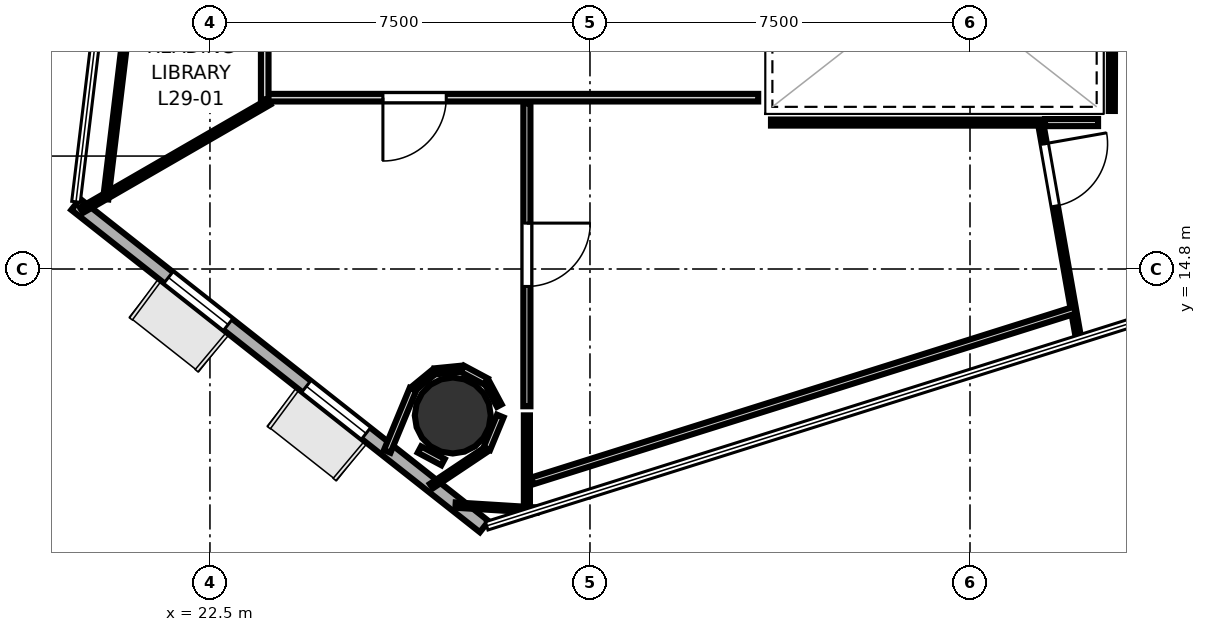
"""IFC4 building model, lengths in metres.
Left out: names, types, materials, properties, quantities, classifications, styles, units other than length and angle.
Written with IfcOpenShell. Run it as: python <this file> out.ifc"""

import sys

from ifc_helpers import new_model, si_unit, direction, frame, frame_2d, origin, origin_2d, place, context, subcontext, project, spatial, rectangle, hollow_circle, extrude, element, fill, save


model = new_model("IFC4")
c1 = context("Model", 3, precision=1e-05, world=origin(), true_north=direction((0.0, 1.0)))
c2 = subcontext(c1, "Body", "Model", "MODEL_VIEW")
j1 = project(units=[si_unit("LENGTHUNIT", "METRE"), si_unit("PLANEANGLEUNIT", "RADIAN")], contexts=[c1])
p1 = place(None, origin())
s1 = spatial("IfcSite", under=j1, at=p1, CompositionType="ELEMENT")
p2 = place(p1, origin())
s2 = spatial("IfcBuilding", under=s1, at=p2, CompositionType="ELEMENT")
p3 = place(p2, frame((0.0, 0.0, 116.3)))
s3 = spatial("IfcBuildingStorey", under=s2, at=p3, CompositionType="ELEMENT", Elevation=116.3)
p4 = place(p3, frame((27.292, 11.909, 0.0), z_axis=(0.0, 0.0, 1.0), x_axis=(1.0, 0.0, 0.0)))
e1 = element("IfcColumn", 1, at=p4, inside=s3, PredefinedType="COLUMN", context=c2, shape_type="SweptSolid", body=[
    extrude(hollow_circle(Radius=0.75, WallThickness=0.036, at=origin_2d()), origin(), (0.0, 0.0, 1.0), 3.7),
])
p5 = place(p3, frame((19.85, 16.076, 0.0), z_axis=(0.0, 0.0, 1.0), x_axis=(0.785148009035, -0.619308165543, 0.0)))
e2 = element("IfcWall", 2, at=p5, inside=s3, PredefinedType="SOLIDWALL", context=c2, shape_type="SweptSolid", body=[
    extrude(rectangle(XDim=10.27, YDim=0.28, at=frame_2d((5.135, 0.0))), origin(), (0.0, 0.0, 1.0), 3.52),
])
p6 = place(p5, frame((2.331, 0.0, 0.85)))
e3 = element("IfcOpeningElement", 3, at=p6, cuts=e2, PredefinedType="OPENING", context=c2, shape_type="SweptSolid", body=[
    extrude(rectangle(XDim=1.5, YDim=2.1, at=frame_2d((0.75, 1.05))), frame((0.0, 0.15, 0.0), z_axis=(0.0, -1.0, 0.0), x_axis=(1.0, 0.0, 0.0)), (0.0, 0.0, 1.0), 0.3),
])
p7 = place(p5, frame((5.799, 0.0, 0.85)))
e4 = element("IfcOpeningElement", 4, at=p7, cuts=e2, PredefinedType="OPENING", context=c2, shape_type="SweptSolid", body=[
    extrude(rectangle(XDim=1.5, YDim=2.1, at=frame_2d((0.75, 1.05))), frame((0.0, 0.15, 0.0), z_axis=(0.0, -1.0, 0.0), x_axis=(1.0, 0.0, 0.0)), (0.0, 0.0, 1.0), 0.3),
])
p8 = place(p3, frame((33.32, 18.181, 0.0), z_axis=(0.0, 0.0, 1.0), x_axis=(-1.0, 0.0, 0.0)))
e5 = element("IfcWall", 5, at=p8, inside=s3, PredefinedType="PARTITIONING", context=c2, shape_type="SweptSolid", body=[
    extrude(rectangle(XDim=9.77, YDim=0.15, at=frame_2d((4.885, 0.0))), origin(), (0.0, 0.0, 1.0), 2.84),
])
p9 = place(p8, frame((6.156, 0.0, 0.0)))
e6 = element("IfcOpeningElement", 6, at=p9, cuts=e5, PredefinedType="OPENING", context=c2, shape_type="SweptSolid", body=[
    extrude(rectangle(XDim=1.25, YDim=2.2, at=frame_2d((0.625, 1.1))), frame((0.0, 0.085, 0.0), z_axis=(0.0, -1.0, 0.0), x_axis=(1.0, 0.0, 0.0)), (0.0, 0.0, 1.0), 0.17),
])
p10 = place(p3, frame((23.581, 18.15, 0.0), z_axis=(0.0, 0.0, 1.0), x_axis=(0.0, 1.0, 0.0)))
e7 = element("IfcWall", 7, at=p10, inside=s3, PredefinedType="PARTITIONING", context=c2, shape_type="SweptSolid", body=[
    extrude(rectangle(XDim=8.575, YDim=0.15, at=frame_2d((4.288, 0.0))), origin(), (0.0, 0.0, 1.0), 2.84),
])
p11 = place(p10, frame((3.663, 0.0, 0.0)))
e8 = element("IfcOpeningElement", 8, at=p11, cuts=e7, PredefinedType="OPENING", context=c2, shape_type="SweptSolid", body=[
    extrude(rectangle(XDim=1.25, YDim=2.2, at=frame_2d((0.625, 1.1))), frame((0.0, 0.085, 0.0), z_axis=(0.0, -1.0, 0.0), x_axis=(1.0, 0.0, 0.0)), (0.0, 0.0, 1.0), 0.17),
])
p12 = place(p3, frame((23.665, 18.097, 0.0), z_axis=(0.0, 0.0, 1.0), x_axis=(-0.866050431771, -0.49995664775, 0.0)))
e9 = element("IfcWall", 9, at=p12, inside=s3, PredefinedType="PARTITIONING", context=c2, shape_type="SweptSolid", body=[
    extrude(rectangle(XDim=4.271, YDim=0.12, at=frame_2d((2.136, 0.0))), origin(), (0.0, 0.0, 1.0), 2.84),
])
p13 = place(p3, frame((20.443, 16.179, 0.0), z_axis=(0.0, 0.0, 1.0), x_axis=(0.11977901292, 0.992800578195, 0.0)))
e10 = element("IfcWall", 10, at=p13, inside=s3, PredefinedType="PARTITIONING", context=c2, shape_type="SweptSolid", body=[
    extrude(rectangle(XDim=17.847, YDim=0.105, at=frame_2d((8.923, 0.0))), origin(), (0.0, 0.0, 1.0), 2.84),
])
p14 = place(p3, frame((28.211, 12.104, 0.0), z_axis=(0.0, 0.0, 1.0), x_axis=(-0.472156867062, 0.881514544909, 0.0)))
e11 = element("IfcWall", 11, at=p14, inside=s3, PredefinedType="PARTITIONING", context=c2, shape_type="SweptSolid", body=[
    extrude(rectangle(XDim=0.525, YDim=0.105, at=frame_2d((0.262, 0.0))), origin(), (0.0, 0.0, 1.0), 2.84),
])
p15 = place(p3, frame((27.95, 12.58, 0.0), z_axis=(0.0, 0.0, 1.0), x_axis=(-0.881994580882, 0.471259545574, 0.0)))
e12 = element("IfcWall", 12, at=p15, inside=s3, PredefinedType="PARTITIONING", context=c2, shape_type="SweptSolid", body=[
    extrude(rectangle(XDim=0.528, YDim=0.14, at=frame_2d((0.264, 0.0))), origin(), (0.0, 0.0, 1.0), 2.84),
])
p16 = place(p3, frame((27.467, 12.833, 0.0), z_axis=(0.0, 0.0, 1.0), x_axis=(-0.995146366598, -0.09840583848, 0.0)))
e13 = element("IfcWall", 13, at=p16, inside=s3, PredefinedType="PARTITIONING", context=c2, shape_type="SweptSolid", body=[
    extrude(rectangle(XDim=0.529, YDim=0.12, at=frame_2d((0.264, 0.0))), origin(), (0.0, 0.0, 1.0), 2.84),
])
p17 = place(p3, frame((26.924, 12.774, 0.0), z_axis=(0.0, 0.0, 1.0), x_axis=(-0.773009460249, -0.634394494275, 0.0)))
e14 = element("IfcWall", 14, at=p17, inside=s3, PredefinedType="PARTITIONING", context=c2, shape_type="SweptSolid", body=[
    extrude(rectangle(XDim=0.528, YDim=0.105, at=frame_2d((0.264, 0.0))), origin(), (0.0, 0.0, 1.0), 2.84),
])
p18 = place(p3, frame((26.507, 12.427, 0.0), z_axis=(0.0, 0.0, 1.0), x_axis=(-0.38275828623, -0.923848523473, 0.0)))
e15 = element("IfcWall", 15, at=p18, inside=s3, PredefinedType="PARTITIONING", context=c2, shape_type="SweptSolid", body=[
    extrude(rectangle(XDim=1.326, YDim=0.14, at=frame_2d((0.663, 0.0))), origin(), (0.0, 0.0, 1.0), 2.84),
])
p19 = place(p3, frame((26.634, 11.238, 0.0), z_axis=(0.0, 0.0, 1.0), x_axis=(0.881802511994, -0.471618839574, 0.0)))
e16 = element("IfcWall", 16, at=p19, inside=s3, PredefinedType="PARTITIONING", context=c2, shape_type="SweptSolid", body=[
    extrude(rectangle(XDim=0.529, YDim=0.14, at=frame_2d((0.264, 0.0))), origin(), (0.0, 0.0, 1.0), 2.84),
])
p20 = place(p3, frame((26.869, 10.515, 0.0), z_axis=(0.0, 0.0, 1.0), x_axis=(0.831386976724, 0.555693885997, 0.0)))
e17 = element("IfcWall", 17, at=p20, inside=s3, PredefinedType="PARTITIONING", context=c2, shape_type="SweptSolid", body=[
    extrude(rectangle(XDim=1.303, YDim=0.105, at=frame_2d((0.652, 0.0))), origin(), (0.0, 0.0, 1.0), 2.84),
])
p21 = place(p3, frame((27.964, 11.254, 0.0), z_axis=(0.0, 0.0, 1.0), x_axis=(0.381929177829, 0.92419159438, 0.0)))
e18 = element("IfcWall", 18, at=p21, inside=s3, PredefinedType="PARTITIONING", context=c2, shape_type="SweptSolid", body=[
    extrude(rectangle(XDim=0.698, YDim=0.14, at=frame_2d((0.349, 0.0))), origin(), (0.0, 0.0, 1.0), 2.84),
])
p22 = place(p3, frame((28.755, 11.912, 0.0), z_axis=(0.0, 0.0, 1.0), x_axis=(0.0, -1.0, 0.0)))
e19 = element("IfcWall", 19, at=p22, inside=s3, PredefinedType="PARTITIONING", context=c2, shape_type="SweptSolid", body=[
    extrude(rectangle(XDim=1.951, YDim=0.12, at=frame_2d((0.976, 0.0))), origin(), (0.0, 0.0, 1.0), 2.84),
])
p23 = place(p3, frame((28.95, 10.042, 0.0), z_axis=(0.0, 0.0, 1.0), x_axis=(-0.998073234179, 0.062046911404, 0.0)))
e20 = element("IfcWall", 20, at=p23, inside=s3, PredefinedType="PARTITIONING", context=c2, shape_type="SweptSolid", body=[
    extrude(rectangle(XDim=1.605, YDim=0.105, at=frame_2d((0.803, 0.0))), origin(), (0.0, 0.0, 1.0), 2.84),
])
p24 = place(p3, frame((28.755, 18.07, 0.0), z_axis=(0.0, 0.0, 1.0), x_axis=(0.0, -1.0, 0.0)))
e21 = element("IfcWall", 21, at=p24, inside=s3, PredefinedType="PARTITIONING", context=c2, shape_type="SweptSolid", body=[
    extrude(rectangle(XDim=5.979, YDim=0.14, at=frame_2d((2.989, 0.0))), origin(), (0.0, 0.0, 1.0), 2.84),
])
p25 = place(p24, frame((2.364, 0.0, 0.0)))
e22 = element("IfcOpeningElement", 22, at=p25, cuts=e21, PredefinedType="OPENING", context=c2, shape_type="SweptSolid", body=[
    extrude(rectangle(XDim=1.25, YDim=2.2, at=frame_2d((0.625, 1.1))), frame((0.0, 0.08, 0.0), z_axis=(0.0, -1.0, 0.0), x_axis=(1.0, 0.0, 0.0)), (0.0, 0.0, 1.0), 0.16),
])
p26 = place(p3, frame((33.573, 17.69, 0.0), z_axis=(0.0, 0.0, 1.0), x_axis=(0.999999973918, -0.000228393928, 0.0)))
e23 = element("IfcWall", 23, at=p26, inside=s3, PredefinedType="PARTITIONING", context=c2, shape_type="SweptSolid", body=[
    extrude(rectangle(XDim=5.345, YDim=0.12, at=frame_2d((2.672, 0.0))), origin(), (0.0, 0.0, 1.0), 2.84),
])
p27 = place(p3, frame((38.887, 17.715, 0.0), z_axis=(0.0, 0.0, 1.0), x_axis=(0.173658486217, -0.984805935281, 0.0)))
e24 = element("IfcWall", 24, at=p27, inside=s3, PredefinedType="PARTITIONING", context=c2, shape_type="SweptSolid", body=[
    extrude(rectangle(XDim=4.392, YDim=0.105, at=frame_2d((2.196, 0.0))), origin(), (0.0, 0.0, 1.0), 2.84),
])
p28 = place(p27, frame((0.451, 0.0, 0.0)))
e25 = element("IfcOpeningElement", 25, at=p28, cuts=e24, PredefinedType="OPENING", context=c2, shape_type="SweptSolid", body=[
    extrude(rectangle(XDim=1.25, YDim=2.2, at=frame_2d((0.625, 1.1))), frame((0.0, 0.062, 0.0), z_axis=(0.0, -1.0, 0.0), x_axis=(1.0, 0.0, 0.0)), (0.0, 0.0, 1.0), 0.125),
])
p29 = place(p3, frame((39.571, 13.99, 0.0), z_axis=(0.0, 0.0, 1.0), x_axis=(-0.953855016975, -0.300267558341, 0.0)))
e26 = element("IfcWall", 26, at=p29, inside=s3, PredefinedType="PARTITIONING", context=c2, shape_type="SweptSolid", body=[
    extrude(rectangle(XDim=11.229, YDim=0.14, at=frame_2d((5.614, 0.0))), origin(), (0.0, 0.0, 1.0), 2.84),
])
p30 = place(p3, frame((38.98, 17.689, 0.0), z_axis=(0.0, 0.0, 1.0), x_axis=(0.999999565315, 0.000932400527, 0.0)))
e27 = element("IfcWall", 27, at=p30, inside=s3, PredefinedType="PARTITIONING", context=c2, shape_type="SweptSolid", body=[
    extrude(rectangle(XDim=1.047, YDim=0.14, at=frame_2d((0.524, 0.0))), origin(), (0.0, 0.0, 1.0), 2.84),
])
p31 = place(p3, frame((40.299, 17.919, 0.0), z_axis=(0.0, 0.0, 1.0), x_axis=(0.0030131236, 0.999995460533, 0.0)))
e28 = element("IfcWall", 28, at=p31, inside=s3, PredefinedType="PARTITIONING", context=c2, shape_type="SweptSolid", body=[
    extrude(rectangle(XDim=4.051, YDim=0.12, at=frame_2d((2.026, 0.0))), origin(), (0.0, 0.0, 1.0), 2.84),
])
p32 = place(p9, origin())
e29 = element("IfcDoor", 29, at=p32, inside=s3, OperationType="SINGLE_SWING_RIGHT", PredefinedType="DOOR", context=c2, shape_type="SweptSolid", body=[
    extrude(rectangle(XDim=1.25, YDim=2.2, at=frame_2d((0.625, 1.1))), frame((0.0, 0.025, 0.0), z_axis=(0.0, -1.0, 0.0), x_axis=(1.0, 0.0, 0.0)), (0.0, 0.0, 1.0), 0.05),
])
fill(e6, e29)
p33 = place(p25, origin())
e30 = element("IfcDoor", 30, at=p33, inside=s3, OperationType="SINGLE_SWING_LEFT", PredefinedType="DOOR", context=c2, shape_type="SweptSolid", body=[
    extrude(rectangle(XDim=1.25, YDim=2.2, at=frame_2d((0.625, 1.1))), frame((0.0, 0.025, 0.0), z_axis=(0.0, -1.0, 0.0), x_axis=(1.0, 0.0, 0.0)), (0.0, 0.0, 1.0), 0.05),
])
fill(e22, e30)
p34 = place(p28, origin())
e31 = element("IfcDoor", 31, at=p34, inside=s3, OperationType="SINGLE_SWING_LEFT", PredefinedType="DOOR", context=c2, shape_type="SweptSolid", body=[
    extrude(rectangle(XDim=1.25, YDim=2.2, at=frame_2d((0.625, 1.1))), frame((0.0, 0.025, 0.0), z_axis=(0.0, -1.0, 0.0), x_axis=(1.0, 0.0, 0.0)), (0.0, 0.0, 1.0), 0.05),
])
fill(e25, e31)
p35 = place(p6, origin())
e32 = element("IfcWindow", 32, at=p35, inside=s3, PartitioningType="SINGLE_PANEL", PredefinedType="WINDOW", context=c2, shape_type="SweptSolid", body=[
    extrude(rectangle(XDim=1.5, YDim=2.1, at=frame_2d((0.75, 1.05))), frame((0.0, 0.03, 0.0), z_axis=(0.0, -1.0, 0.0), x_axis=(1.0, 0.0, 0.0)), (0.0, 0.0, 1.0), 0.06),
])
fill(e3, e32)
p36 = place(p7, origin())
e33 = element("IfcWindow", 33, at=p36, inside=s3, PartitioningType="SINGLE_PANEL", PredefinedType="WINDOW", context=c2, shape_type="SweptSolid", body=[
    extrude(rectangle(XDim=1.5, YDim=2.1, at=frame_2d((0.75, 1.05))), frame((0.0, 0.03, 0.0), z_axis=(0.0, -1.0, 0.0), x_axis=(1.0, 0.0, 0.0)), (0.0, 0.0, 1.0), 0.06),
])
fill(e4, e33)
save(model, sys.argv[1])
